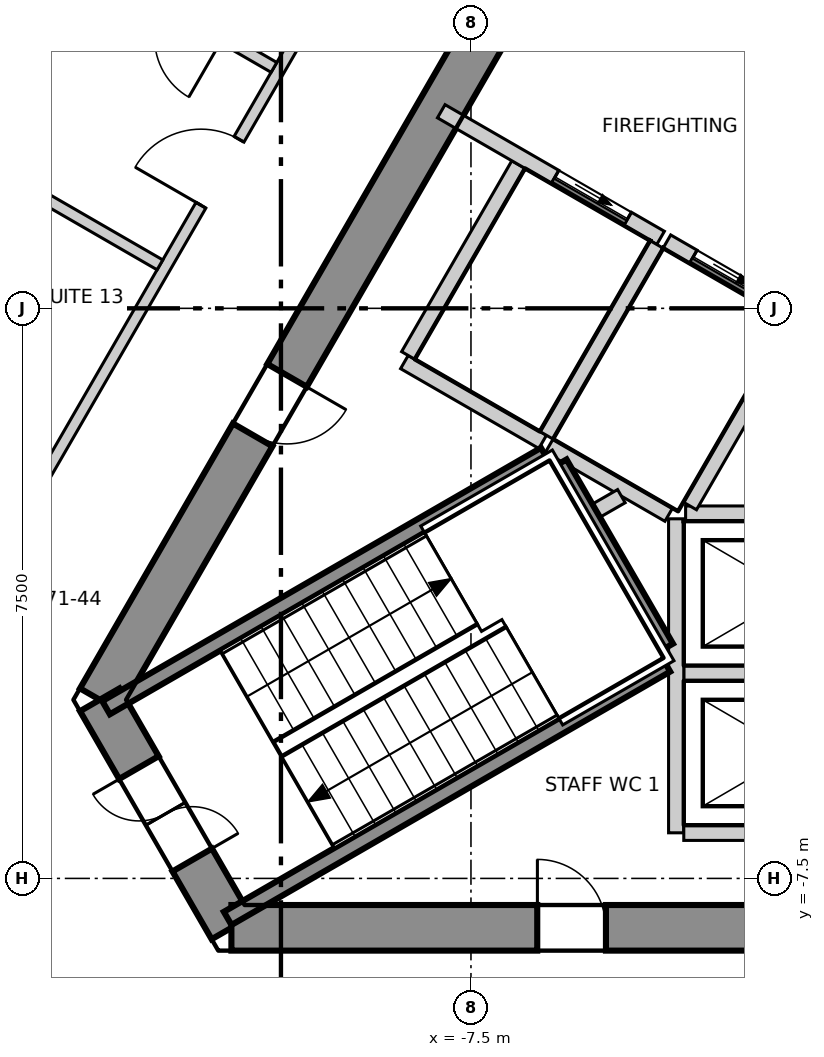
"""IFC4 building model, lengths in metres.
Left out: names, types, materials, properties, quantities, classifications, styles, units other than length and angle.
Written with IfcOpenShell. Run it as: python <this file> out.ifc"""

import sys

from ifc_helpers import new_model, si_unit, direction, frame, frame_2d, origin, place, context, subcontext, project, spatial, polyline, rectangle, outline, extrude, element, fill, save


model = new_model("IFC4")
c1 = context("Model", 3, precision=1e-05, world=origin(), true_north=direction((0.0, 1.0)))
c2 = subcontext(c1, "Body", "Model", "MODEL_VIEW")
j1 = project(units=[si_unit("LENGTHUNIT", "METRE"), si_unit("PLANEANGLEUNIT", "RADIAN")], contexts=[c1])
p1 = place(None, origin())
s1 = spatial("IfcSite", under=j1, at=p1, CompositionType="ELEMENT")
p2 = place(p1, origin())
s2 = spatial("IfcBuilding", under=s1, at=p2, CompositionType="ELEMENT")
p3 = place(p2, frame((0.0, 0.0, 300.7)))
s3 = spatial("IfcBuildingStorey", under=s2, at=p3, CompositionType="ELEMENT", Elevation=300.7)
p4 = place(p3, frame((-1.732, 13.3, -0.3), z_axis=(0.0, 0.0, 1.0), x_axis=(-0.500000539815, -0.866025092122, 0.0)))
e1 = element("IfcWall", 1, at=p4, inside=s3, PredefinedType="SHEAR", context=c2, shape_type="SweptSolid", body=[
    extrude(outline(polyline([(-0.173, -0.3), (1.795, -0.3), (3.763, -0.3), (5.732, -0.3), (7.7, -0.3), (9.668, -0.301), (11.637, -0.301), (13.605, -0.301), (15.573, -0.301), (17.542, -0.301), (19.51, -0.301), (21.478, -0.301), (21.131, 0.3), (19.226, 0.3), (17.321, 0.3), (15.415, 0.3), (13.51, 0.3), (11.605, 0.3), (9.699, 0.3), (7.794, 0.3), (5.889, 0.3), (3.984, 0.3), (2.078, 0.3), (0.173, 0.3), (-0.173, -0.3)])), origin(), (0.0, 0.0, 1.0), 3.6),
])
p5 = place(p4, frame((10.102, 0.0, 0.3)))
e2 = element("IfcOpeningElement", 2, at=p5, cuts=e1, PredefinedType="OPENING", context=c2, shape_type="SweptSolid", body=[
    extrude(rectangle(XDim=1.1, YDim=2.1, at=frame_2d((0.55, 1.05))), frame((0.0, 0.31, 0.0), z_axis=(0.0, -1.0, 0.0), x_axis=(1.0, 0.0, 0.0)), (0.0, 0.0, 1.0), 0.621),
])
p6 = place(p4, frame((16.378, 0.0, 0.3)))
e3 = element("IfcOpeningElement", 3, at=p6, cuts=e1, PredefinedType="OPENING", context=c2, shape_type="SweptSolid", body=[
    extrude(rectangle(XDim=0.9, YDim=2.1, at=frame_2d((0.45, 1.05))), frame((0.0, 0.31, 0.0), z_axis=(0.0, -1.0, 0.0), x_axis=(1.0, 0.0, 0.0)), (0.0, 0.0, 1.0), 0.621),
])
p7 = place(p4, frame((4.026, 0.0, 0.3)))
e4 = element("IfcOpeningElement", 4, at=p7, cuts=e1, PredefinedType="OPENING", context=c2, shape_type="SweptSolid", body=[
    extrude(rectangle(XDim=0.9, YDim=2.1, at=frame_2d((0.45, 1.05))), frame((0.0, 0.31, 0.0), z_axis=(0.0, -1.0, 0.0), x_axis=(1.0, 0.0, 0.0)), (0.0, 0.0, 1.0), 0.621),
])
p8 = place(p3, frame((-12.384, -5.15, -0.3), z_axis=(0.0, 0.0, 1.0), x_axis=(0.49997462182, -0.866040055388, 0.0)))
e5 = element("IfcWall", 5, at=p8, inside=s3, PredefinedType="SHEAR", context=c2, shape_type="SweptSolid", body=[
    extrude(outline(polyline([(-0.173, -0.301), (1.732, -0.301), (3.637, -0.3), (3.291, 0.3), (1.732, 0.3), (0.173, 0.3), (-0.173, -0.301)])), origin(), (0.0, 0.0, 1.0), 3.6),
])
p9 = place(p8, frame((1.032, 0.0, 0.3)))
e6 = element("IfcOpeningElement", 6, at=p9, cuts=e5, PredefinedType="OPENING", context=c2, shape_type="SweptSolid", body=[
    extrude(rectangle(XDim=1.4, YDim=2.1, at=frame_2d((0.7, 1.05))), frame((0.0, 0.31, 0.0), z_axis=(0.0, -1.0, 0.0), x_axis=(1.0, 0.0, 0.0)), (0.0, 0.0, 1.0), 0.621),
])
p10 = place(p3, frame((-10.652, -8.15, -0.3), z_axis=(0.0, 0.0, 1.0), x_axis=(1.0, 0.0, 0.0)))
e7 = element("IfcWall", 7, at=p10, inside=s3, PredefinedType="SHEAR", context=c2, shape_type="SweptSolid", body=[
    extrude(outline(polyline([(-0.173, -0.3), (1.795, -0.3), (3.763, -0.3), (5.731, -0.3), (7.7, -0.3), (9.668, -0.3), (11.636, -0.3), (13.604, -0.3), (15.573, -0.3), (17.541, -0.3), (19.509, -0.3), (21.477, -0.3), (21.131, 0.3), (19.226, 0.3), (17.321, 0.3), (15.415, 0.3), (13.51, 0.3), (11.605, 0.3), (9.699, 0.3), (7.794, 0.3), (5.889, 0.3), (3.984, 0.3), (2.078, 0.3), (0.173, 0.3), (-0.173, -0.3)])), origin(), (0.0, 0.0, 1.0), 3.6),
])
p11 = place(p10, frame((9.752, 0.0, 0.3)))
e8 = element("IfcOpeningElement", 8, at=p11, cuts=e7, PredefinedType="OPENING", context=c2, shape_type="SweptSolid", body=[
    extrude(rectangle(XDim=1.8, YDim=2.1, at=frame_2d((0.9, 1.05))), frame((0.0, 0.31, 0.0), z_axis=(0.0, -1.0, 0.0), x_axis=(1.0, 0.0, 0.0)), (0.0, 0.0, 1.0), 0.62),
])
p12 = place(p10, frame((4.026, 0.0, 0.3)))
e9 = element("IfcOpeningElement", 9, at=p12, cuts=e7, PredefinedType="OPENING", context=c2, shape_type="SweptSolid", body=[
    extrude(rectangle(XDim=0.9, YDim=2.1, at=frame_2d((0.45, 1.05))), frame((0.0, 0.31, 0.0), z_axis=(0.0, -1.0, 0.0), x_axis=(1.0, 0.0, 0.0)), (0.0, 0.0, 1.0), 0.62),
])
p13 = place(p10, frame((16.378, 0.0, 0.3)))
e10 = element("IfcOpeningElement", 10, at=p13, cuts=e7, PredefinedType="OPENING", context=c2, shape_type="SweptSolid", body=[
    extrude(rectangle(XDim=0.9, YDim=2.1, at=frame_2d((0.45, 1.05))), frame((0.0, 0.31, 0.0), z_axis=(0.0, -1.0, 0.0), x_axis=(1.0, 0.0, 0.0)), (0.0, 0.0, 1.0), 0.62),
])
p14 = place(p3, frame((-2.453, 27.405, 0.0), z_axis=(0.0, 0.0, 1.0), x_axis=(-0.500000041859, -0.866025379617, 0.0)))
e11 = element("IfcWall", 11, at=p14, inside=s3, PredefinedType="ELEMENTEDWALL", context=c2, shape_type="SweptSolid", body=[
    extrude(rectangle(XDim=44.994, YDim=0.2, at=frame_2d((22.497, 0.0))), origin(), (0.0, 0.0, 1.0), 3.3),
])
p15 = place(p14, frame((2.103, 0.0, 0.9)))
e12 = element("IfcOpeningElement", 12, at=p15, cuts=e11, PredefinedType="OPENING", context=c2, shape_type="SweptSolid", body=[
    extrude(rectangle(XDim=3.7, YDim=2.2, at=frame_2d((1.85, 1.1))), frame((0.0, 0.11, 0.0), z_axis=(0.0, -1.0, 0.0), x_axis=(1.0, 0.0, 0.0)), (0.0, 0.0, 1.0), 0.22),
])
p16 = place(p14, frame((7.404, 0.0, 0.9)))
e13 = element("IfcOpeningElement", 13, at=p16, cuts=e11, PredefinedType="OPENING", context=c2, shape_type="SweptSolid", body=[
    extrude(rectangle(XDim=3.7, YDim=2.2, at=frame_2d((1.85, 1.1))), frame((0.0, 0.11, 0.0), z_axis=(0.0, -1.0, 0.0), x_axis=(1.0, 0.0, 0.0)), (0.0, 0.0, 1.0), 0.22),
])
p17 = place(p14, frame((12.705, 0.0, 0.9)))
e14 = element("IfcOpeningElement", 14, at=p17, cuts=e11, PredefinedType="OPENING", context=c2, shape_type="SweptSolid", body=[
    extrude(rectangle(XDim=3.7, YDim=2.2, at=frame_2d((1.85, 1.1))), frame((0.0, 0.11, 0.0), z_axis=(0.0, -1.0, 0.0), x_axis=(1.0, 0.0, 0.0)), (0.0, 0.0, 1.0), 0.22),
])
p18 = place(p14, frame((18.006, 0.0, 0.9)))
e15 = element("IfcOpeningElement", 15, at=p18, cuts=e11, PredefinedType="OPENING", context=c2, shape_type="SweptSolid", body=[
    extrude(rectangle(XDim=3.7, YDim=2.2, at=frame_2d((1.85, 1.1))), frame((0.0, 0.11, 0.0), z_axis=(0.0, -1.0, 0.0), x_axis=(1.0, 0.0, 0.0)), (0.0, 0.0, 1.0), 0.22),
])
p19 = place(p14, frame((23.307, 0.0, 0.9)))
e16 = element("IfcOpeningElement", 16, at=p19, cuts=e11, PredefinedType="OPENING", context=c2, shape_type="SweptSolid", body=[
    extrude(rectangle(XDim=3.7, YDim=2.2, at=frame_2d((1.85, 1.1))), frame((0.0, 0.11, 0.0), z_axis=(0.0, -1.0, 0.0), x_axis=(1.0, 0.0, 0.0)), (0.0, 0.0, 1.0), 0.22),
])
p20 = place(p14, frame((28.608, 0.0, 0.9)))
e17 = element("IfcOpeningElement", 17, at=p20, cuts=e11, PredefinedType="OPENING", context=c2, shape_type="SweptSolid", body=[
    extrude(rectangle(XDim=3.7, YDim=2.2, at=frame_2d((1.85, 1.1))), frame((0.0, 0.11, 0.0), z_axis=(0.0, -1.0, 0.0), x_axis=(1.0, 0.0, 0.0)), (0.0, 0.0, 1.0), 0.22),
])
p21 = place(p14, frame((33.909, 0.0, 0.9)))
e18 = element("IfcOpeningElement", 18, at=p21, cuts=e11, PredefinedType="OPENING", context=c2, shape_type="SweptSolid", body=[
    extrude(rectangle(XDim=3.7, YDim=2.2, at=frame_2d((1.85, 1.1))), frame((0.0, 0.11, 0.0), z_axis=(0.0, -1.0, 0.0), x_axis=(1.0, 0.0, 0.0)), (0.0, 0.0, 1.0), 0.22),
])
p22 = place(p14, frame((39.21, 0.0, 0.9)))
e19 = element("IfcOpeningElement", 19, at=p22, cuts=e11, PredefinedType="OPENING", context=c2, shape_type="SweptSolid", body=[
    extrude(rectangle(XDim=3.7, YDim=2.2, at=frame_2d((1.85, 1.1))), frame((0.0, 0.11, 0.0), z_axis=(0.0, -1.0, 0.0), x_axis=(1.0, 0.0, 0.0)), (0.0, 0.0, 1.0), 0.22),
])
p23 = place(p3, frame((-17.679, -10.12, 0.0), z_axis=(0.0, 0.0, 1.0), x_axis=(0.500008955215, 0.866020233427, 0.0)))
e20 = element("IfcWall", 20, at=p23, inside=s3, PredefinedType="PARTITIONING", context=c2, shape_type="SweptSolid", body=[
    extrude(rectangle(XDim=35.357, YDim=0.15, at=frame_2d((17.679, 0.0))), origin(), (0.0, 0.0, 1.0), 3.3),
])
p24 = place(p23, frame((31.307, 0.0, 0.0)))
e21 = element("IfcOpeningElement", 21, at=p24, cuts=e20, PredefinedType="OPENING", context=c2, shape_type="SweptSolid", body=[
    extrude(rectangle(XDim=1.0, YDim=2.1, at=frame_2d((0.5, 1.05))), frame((0.0, 0.085, 0.0), z_axis=(0.0, -1.0, 0.0), x_axis=(1.0, 0.0, 0.0)), (0.0, 0.0, 1.0), 0.17),
])
p25 = place(p23, frame((20.056, 0.0, 0.0)))
e22 = element("IfcOpeningElement", 22, at=p25, cuts=e20, PredefinedType="OPENING", context=c2, shape_type="SweptSolid", body=[
    extrude(rectangle(XDim=1.0, YDim=2.1, at=frame_2d((0.5, 1.05))), frame((0.0, 0.085, 0.0), z_axis=(0.0, -1.0, 0.0), x_axis=(1.0, 0.0, 0.0)), (0.0, 0.0, 1.0), 0.17),
])
p26 = place(p23, frame((13.253, 0.0, 0.0)))
e23 = element("IfcOpeningElement", 23, at=p26, cuts=e20, PredefinedType="OPENING", context=c2, shape_type="SweptSolid", body=[
    extrude(rectangle(XDim=1.0, YDim=2.1, at=frame_2d((0.5, 1.05))), frame((0.0, 0.085, 0.0), z_axis=(0.0, -1.0, 0.0), x_axis=(1.0, 0.0, 0.0)), (0.0, 0.0, 1.0), 0.17),
])
p27 = place(p23, frame((7.653, 0.0, 0.0)))
e24 = element("IfcOpeningElement", 24, at=p27, cuts=e20, PredefinedType="OPENING", context=c2, shape_type="SweptSolid", body=[
    extrude(rectangle(XDim=1.0, YDim=2.1, at=frame_2d((0.5, 1.05))), frame((0.0, 0.085, 0.0), z_axis=(0.0, -1.0, 0.0), x_axis=(1.0, 0.0, 0.0)), (0.0, 0.0, 1.0), 0.17),
])
p28 = place(p23, frame((2.952, 0.0, 0.0)))
e25 = element("IfcOpeningElement", 25, at=p28, cuts=e20, PredefinedType="OPENING", context=c2, shape_type="SweptSolid", body=[
    extrude(rectangle(XDim=1.0, YDim=2.1, at=frame_2d((0.5, 1.05))), frame((0.0, 0.085, 0.0), z_axis=(0.0, -1.0, 0.0), x_axis=(1.0, 0.0, 0.0)), (0.0, 0.0, 1.0), 0.17),
])
p29 = place(p3, frame((-16.288, 3.283, 0.0), z_axis=(0.0, 0.0, 1.0), x_axis=(0.866051380023, -0.499955005135, 0.0)))
e26 = element("IfcWall", 26, at=p29, inside=s3, PredefinedType="PARTITIONING", context=c2, shape_type="SweptSolid", body=[
    extrude(rectangle(XDim=5.422, YDim=0.15, at=frame_2d((2.711, 0.0))), origin(), (0.0, 0.0, 1.0), 3.3),
])
p30 = place(p3, frame((-12.3, 4.445, 0.0), z_axis=(0.0, 0.0, 1.0), x_axis=(0.865965520905, -0.500103705848, 0.0)))
e27 = element("IfcWall", 27, at=p30, inside=s3, PredefinedType="PARTITIONING", context=c2, shape_type="SweptSolid", body=[
    extrude(rectangle(XDim=2.55, YDim=0.15, at=frame_2d((1.275, 0.0))), origin(), (0.0, 0.0, 1.0), 3.3),
])
p31 = place(p30, frame((0.875, 0.0, 0.0)))
e28 = element("IfcOpeningElement", 28, at=p31, cuts=e27, PredefinedType="OPENING", context=c2, shape_type="SweptSolid", body=[
    extrude(rectangle(XDim=0.9, YDim=2.1, at=frame_2d((0.45, 1.05))), frame((0.0, 0.085, 0.0), z_axis=(0.0, -1.0, 0.0), x_axis=(1.0, 0.0, 0.0)), (0.0, 0.0, 1.0), 0.17),
])
p32 = place(p3, frame((-8.376, -0.707, 0.0), z_axis=(0.0, 0.0, 1.0), x_axis=(0.866067520717, -0.499927044236, 0.0)))
e29 = element("IfcWall", 29, at=p32, inside=s3, PredefinedType="SOLIDWALL", context=c2, shape_type="SweptSolid", body=[
    extrude(rectangle(XDim=2.1, YDim=0.2, at=frame_2d((1.05, 0.0))), origin(), (0.0, 0.0, 1.0), 3.3),
])
p33 = place(p3, frame((-8.326, -0.62, 0.0), z_axis=(0.0, 0.0, 1.0), x_axis=(0.500023687443, 0.866011727401, 0.0)))
e30 = element("IfcWall", 30, at=p33, inside=s3, PredefinedType="SOLIDWALL", context=c2, shape_type="SweptSolid", body=[
    extrude(rectangle(XDim=2.9, YDim=0.2, at=frame_2d((1.45, 0.0))), origin(), (0.0, 0.0, 1.0), 3.3),
])
p34 = place(p3, frame((-4.7, -4.8, 0.0), z_axis=(0.0, 0.0, 1.0), x_axis=(1.0, 0.0, 0.0)))
e31 = element("IfcWall", 31, at=p34, inside=s3, PredefinedType="SOLIDWALL", context=c2, shape_type="SweptSolid", body=[
    extrude(rectangle(XDim=2.9, YDim=0.2, at=frame_2d((1.45, 0.0))), origin(), (0.0, 0.0, 1.0), 3.3),
])
p35 = place(p3, frame((-4.8, -6.9, 0.0), z_axis=(0.0, 0.0, 1.0), x_axis=(0.0, 1.0, 0.0)))
e32 = element("IfcWall", 32, at=p35, inside=s3, PredefinedType="SOLIDWALL", context=c2, shape_type="SweptSolid", body=[
    extrude(rectangle(XDim=4.131, YDim=0.2, at=frame_2d((2.065, 0.0))), origin(), (0.0, 0.0, 1.0), 3.3),
])
p36 = place(p3, frame((-4.7, -6.9, 0.0), z_axis=(0.0, 0.0, 1.0), x_axis=(1.0, 0.0, 0.0)))
e33 = element("IfcWall", 33, at=p36, inside=s3, PredefinedType="SOLIDWALL", context=c2, shape_type="SweptSolid", body=[
    extrude(rectangle(XDim=2.9, YDim=0.2, at=frame_2d((1.45, 0.0))), origin(), (0.0, 0.0, 1.0), 3.3),
])
p37 = place(p3, frame((-4.676, -2.7, 0.0), z_axis=(0.0, 0.0, 1.0), x_axis=(1.0, 0.0, 0.0)))
e34 = element("IfcWall", 34, at=p37, inside=s3, PredefinedType="SOLIDWALL", context=c2, shape_type="SweptSolid", body=[
    extrude(rectangle(XDim=2.873, YDim=0.2, at=frame_2d((1.437, 0.0))), origin(), (0.0, 0.0, 1.0), 3.3),
])
p38 = place(p37, frame((0.937, 0.0, 0.0)))
e35 = element("IfcOpeningElement", 35, at=p38, cuts=e34, PredefinedType="OPENING", context=c2, shape_type="SweptSolid", body=[
    extrude(rectangle(XDim=1.1, YDim=2.1, at=frame_2d((0.55, 1.05))), frame((0.0, 0.11, 0.0), z_axis=(0.0, -1.0, 0.0), x_axis=(1.0, 0.0, 0.0)), (0.0, 0.0, 1.0), 0.22),
])
p39 = place(p3, frame((-7.891, 2.593, 0.0), z_axis=(0.0, 0.0, 1.0), x_axis=(0.866070917804, -0.499921159118, 0.0)))
e36 = element("IfcWall", 36, at=p39, inside=s3, PredefinedType="SOLIDWALL", context=c2, shape_type="SweptSolid", body=[
    extrude(rectangle(XDim=3.333, YDim=0.2, at=frame_2d((1.666, 0.0))), origin(), (0.0, 0.0, 1.0), 3.3),
])
p40 = place(p39, frame((1.73, 0.0, 0.0)))
e37 = element("IfcOpeningElement", 37, at=p40, cuts=e36, PredefinedType="OPENING", context=c2, shape_type="SweptSolid", body=[
    extrude(rectangle(XDim=1.1, YDim=2.1, at=frame_2d((0.55, 1.05))), frame((0.0, 0.11, 0.0), z_axis=(0.0, -1.0, 0.0), x_axis=(1.0, 0.0, 0.0)), (0.0, 0.0, 1.0), 0.22),
])
p41 = place(p3, frame((-6.507, -1.67, 0.0), z_axis=(0.0, 0.0, 1.0), x_axis=(0.50012328804, 0.865954211699, 0.0)))
e38 = element("IfcWall", 38, at=p41, inside=s3, PredefinedType="SOLIDWALL", context=c2, shape_type="SweptSolid", body=[
    extrude(rectangle(XDim=2.9, YDim=0.2, at=frame_2d((1.45, 0.0))), origin(), (0.0, 0.0, 1.0), 3.3),
])
p42 = place(p3, frame((-6.47, -1.807, 0.0), z_axis=(0.0, 0.0, 1.0), x_axis=(0.865883195159, -0.500246231712, 0.0)))
e39 = element("IfcWall", 39, at=p42, inside=s3, PredefinedType="SOLIDWALL", context=c2, shape_type="SweptSolid", body=[
    extrude(rectangle(XDim=1.815, YDim=0.2, at=frame_2d((0.908, 0.0))), origin(), (0.0, 0.0, 1.0), 3.3),
])
p43 = place(p3, frame((-4.922, 0.879, 0.0), z_axis=(0.0, 0.0, 1.0), x_axis=(0.866073918653, -0.499915960366, 0.0)))
e40 = element("IfcWall", 40, at=p43, inside=s3, PredefinedType="SOLIDWALL", context=c2, shape_type="SweptSolid", body=[
    extrude(rectangle(XDim=2.002, YDim=0.2, at=frame_2d((1.001, 0.0))), origin(), (0.0, 0.0, 1.0), 3.3),
])
p44 = place(p43, frame((0.402, 0.0, 0.0)))
e41 = element("IfcOpeningElement", 41, at=p44, cuts=e40, PredefinedType="OPENING", context=c2, shape_type="SweptSolid", body=[
    extrude(rectangle(XDim=1.1, YDim=2.1, at=frame_2d((0.55, 1.05))), frame((0.0, 0.11, 0.0), z_axis=(0.0, -1.0, 0.0), x_axis=(1.0, 0.0, 0.0)), (0.0, 0.0, 1.0), 0.22),
])
p45 = place(p3, frame((-4.619, -2.6, 0.0), z_axis=(0.0, 0.0, 1.0), x_axis=(0.50009492287, 0.865970593103, 0.0)))
e42 = element("IfcWall", 42, at=p45, inside=s3, PredefinedType="SOLIDWALL", context=c2, shape_type="SweptSolid", body=[
    extrude(rectangle(XDim=2.761, YDim=0.2, at=frame_2d((1.381, 0.0))), origin(), (0.0, 0.0, 1.0), 3.3),
])
p46 = place(p3, frame((-5.853, -2.662, 0.0), z_axis=(0.0, 0.0, 1.0), x_axis=(0.866630806644, 0.498949942355, 0.0)))
e43 = element("IfcWall", 43, at=p46, inside=s3, PredefinedType="SOLIDWALL", context=c2, shape_type="SweptSolid", body=[
    extrude(rectangle(XDim=0.383, YDim=0.2, at=frame_2d((0.191, 0.0))), origin(), (0.0, 0.0, 1.0), 3.3),
])
p47 = place(p3, frame((-12.301, -5.254, 0.0), z_axis=(0.0, 0.0, 1.0), x_axis=(0.866068467981, 0.499925403204, 0.0)))
e44 = element("IfcWall", 44, at=p47, inside=s3, PredefinedType="SOLIDWALL", context=c2, shape_type="SweptSolid", body=[
    extrude(rectangle(XDim=6.665, YDim=0.2, at=frame_2d((3.332, 0.0))), origin(), (0.0, 0.0, 1.0), 3.3),
])
p48 = place(p3, frame((-6.329, -2.038, 0.0), z_axis=(0.0, 0.0, 1.0), x_axis=(0.500200581029, -0.865909567298, 0.0)))
e45 = element("IfcWall", 45, at=p48, inside=s3, PredefinedType="SOLIDWALL", context=c2, shape_type="SweptSolid", body=[
    extrude(rectangle(XDim=2.799, YDim=0.2, at=frame_2d((1.399, 0.0))), origin(), (0.0, 0.0, 1.0), 3.3),
])
p49 = place(p3, frame((-10.701, -8.026, 0.0), z_axis=(0.0, 0.0, 1.0), x_axis=(0.866005022404, 0.500035299925, 0.0)))
e46 = element("IfcWall", 46, at=p49, inside=s3, PredefinedType="SOLIDWALL", context=c2, shape_type="SweptSolid", body=[
    extrude(rectangle(XDim=6.665, YDim=0.2, at=frame_2d((3.333, 0.0))), origin(), (0.0, 0.0, 1.0), 3.3),
])
p50 = place(p44, origin())
e47 = element("IfcDoor", 47, at=p50, inside=s3, OperationType="SLIDING_TO_LEFT", PredefinedType="DOOR", context=c2, shape_type="SweptSolid", body=[
    extrude(rectangle(XDim=1.1, YDim=2.1, at=frame_2d((0.55, 1.05))), frame((0.0, 0.025, 0.0), z_axis=(0.0, -1.0, 0.0), x_axis=(1.0, 0.0, 0.0)), (0.0, 0.0, 1.0), 0.05),
])
fill(e41, e47)
p51 = place(p40, origin())
e48 = element("IfcDoor", 48, at=p51, inside=s3, OperationType="SLIDING_TO_LEFT", PredefinedType="DOOR", context=c2, shape_type="SweptSolid", body=[
    extrude(rectangle(XDim=1.1, YDim=2.1, at=frame_2d((0.55, 1.05))), frame((0.0, 0.025, 0.0), z_axis=(0.0, -1.0, 0.0), x_axis=(1.0, 0.0, 0.0)), (0.0, 0.0, 1.0), 0.05),
])
fill(e37, e48)
p52 = place(p26, origin())
e49 = element("IfcDoor", 49, at=p52, inside=s3, OperationType="SINGLE_SWING_RIGHT", PredefinedType="DOOR", context=c2, shape_type="SweptSolid", body=[
    extrude(rectangle(XDim=1.0, YDim=2.1, at=frame_2d((0.5, 1.05))), frame((0.0, 0.025, 0.0), z_axis=(0.0, -1.0, 0.0), x_axis=(1.0, 0.0, 0.0)), (0.0, 0.0, 1.0), 0.05),
])
fill(e23, e49)
p53 = place(p9, origin())
e50 = element("IfcDoor", 50, at=p53, inside=s3, OperationType="DOUBLE_DOOR_SINGLE_SWING", PredefinedType="DOOR", context=c2, shape_type="SweptSolid", body=[
    extrude(rectangle(XDim=1.4, YDim=2.1, at=frame_2d((0.7, 1.05))), frame((0.0, 0.025, 0.0), z_axis=(0.0, -1.0, 0.0), x_axis=(1.0, 0.0, 0.0)), (0.0, 0.0, 1.0), 0.05),
])
fill(e6, e50)
p54 = place(p6, origin())
e51 = element("IfcDoor", 51, at=p54, inside=s3, OperationType="SINGLE_SWING_RIGHT", PredefinedType="DOOR", context=c2, shape_type="SweptSolid", body=[
    extrude(rectangle(XDim=0.9, YDim=2.1, at=frame_2d((0.45, 1.05))), frame((0.0, 0.025, 0.0), z_axis=(0.0, -1.0, 0.0), x_axis=(1.0, 0.0, 0.0)), (0.0, 0.0, 1.0), 0.05),
])
fill(e3, e51)
p55 = place(p12, origin())
e52 = element("IfcDoor", 52, at=p55, inside=s3, OperationType="SINGLE_SWING_RIGHT", PredefinedType="DOOR", context=c2, shape_type="SweptSolid", body=[
    extrude(rectangle(XDim=0.9, YDim=2.1, at=frame_2d((0.45, 1.05))), frame((0.0, 0.025, 0.0), z_axis=(0.0, -1.0, 0.0), x_axis=(1.0, 0.0, 0.0)), (0.0, 0.0, 1.0), 0.05),
])
fill(e9, e52)
save(model, sys.argv[1])
